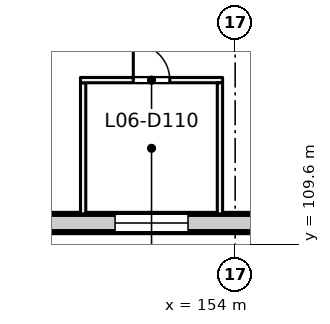
"""IFC4 building model, lengths in metres.
Left out: names, types, materials, properties, quantities, classifications, styles, units other than length and angle.
Written with IfcOpenShell. Run it as: python <this file> out.ifc"""

import sys

from ifc_helpers import new_model, si_unit, direction, frame, frame_2d, origin, place, context, subcontext, project, spatial, rectangle, extrude, element, fill, save


model = new_model("IFC4")
c1 = context("Model", 3, precision=1e-05, world=origin(), true_north=direction((0.0, 1.0)))
c2 = subcontext(c1, "Body", "Model", "MODEL_VIEW")
j1 = project(units=[si_unit("LENGTHUNIT", "METRE"), si_unit("PLANEANGLEUNIT", "RADIAN")], contexts=[c1])
p1 = place(None, origin())
s1 = spatial("IfcSite", under=j1, at=p1, CompositionType="ELEMENT")
p2 = place(p1, origin())
s2 = spatial("IfcBuilding", under=s1, at=p2, CompositionType="ELEMENT")
p3 = place(p2, frame((0.0, 0.0, 31.5)))
s3 = spatial("IfcBuildingStorey", under=s2, at=p3, CompositionType="ELEMENT", Elevation=31.5)
p4 = place(p3, frame((162.93, 110.3, 0.0), z_axis=(0.0, 0.0, 1.0), x_axis=(-1.0, 0.0, 0.0)))
e1 = element("IfcWall", 1, at=p4, inside=s3, PredefinedType="SOLIDWALL", context=c2, shape_type="SweptSolid", body=[
    extrude(rectangle(XDim=31.93, YDim=0.6, at=frame_2d((15.965, 0.0))), origin(), (0.0, 0.0, 1.0), 3.625),
])
p5 = place(p4, frame((1.48, 0.0, 0.9)))
e2 = element("IfcOpeningElement", 2, at=p5, cuts=e1, PredefinedType="OPENING", context=c2, shape_type="SweptSolid", body=[
    extrude(rectangle(XDim=2.4, YDim=2.4, at=frame_2d((1.2, 1.2))), frame((0.0, 0.31, 0.0), z_axis=(0.0, -1.0, 0.0), x_axis=(1.0, 0.0, 0.0)), (0.0, 0.0, 1.0), 0.62),
])
p6 = place(p4, frame((5.98, 0.0, 0.9)))
e3 = element("IfcOpeningElement", 3, at=p6, cuts=e1, PredefinedType="OPENING", context=c2, shape_type="SweptSolid", body=[
    extrude(rectangle(XDim=2.4, YDim=2.4, at=frame_2d((1.2, 1.2))), frame((0.0, 0.31, 0.0), z_axis=(0.0, -1.0, 0.0), x_axis=(1.0, 0.0, 0.0)), (0.0, 0.0, 1.0), 0.62),
])
p7 = place(p4, frame((10.48, 0.0, 0.9)))
e4 = element("IfcOpeningElement", 4, at=p7, cuts=e1, PredefinedType="OPENING", context=c2, shape_type="SweptSolid", body=[
    extrude(rectangle(XDim=2.4, YDim=2.4, at=frame_2d((1.2, 1.2))), frame((0.0, 0.31, 0.0), z_axis=(0.0, -1.0, 0.0), x_axis=(1.0, 0.0, 0.0)), (0.0, 0.0, 1.0), 0.62),
])
p8 = place(p4, frame((14.98, 0.0, 0.9)))
e5 = element("IfcOpeningElement", 5, at=p8, cuts=e1, PredefinedType="OPENING", context=c2, shape_type="SweptSolid", body=[
    extrude(rectangle(XDim=2.4, YDim=2.4, at=frame_2d((1.2, 1.2))), frame((0.0, 0.31, 0.0), z_axis=(0.0, -1.0, 0.0), x_axis=(1.0, 0.0, 0.0)), (0.0, 0.0, 1.0), 0.62),
])
p9 = place(p4, frame((19.48, 0.0, 0.9)))
e6 = element("IfcOpeningElement", 6, at=p9, cuts=e1, PredefinedType="OPENING", context=c2, shape_type="SweptSolid", body=[
    extrude(rectangle(XDim=2.4, YDim=2.4, at=frame_2d((1.2, 1.2))), frame((0.0, 0.31, 0.0), z_axis=(0.0, -1.0, 0.0), x_axis=(1.0, 0.0, 0.0)), (0.0, 0.0, 1.0), 0.62),
])
p10 = place(p4, frame((23.98, 0.0, 0.9)))
e7 = element("IfcOpeningElement", 7, at=p10, cuts=e1, PredefinedType="OPENING", context=c2, shape_type="SweptSolid", body=[
    extrude(rectangle(XDim=2.4, YDim=2.4, at=frame_2d((1.2, 1.2))), frame((0.0, 0.31, 0.0), z_axis=(0.0, -1.0, 0.0), x_axis=(1.0, 0.0, 0.0)), (0.0, 0.0, 1.0), 0.62),
])
p11 = place(p4, frame((28.48, 0.0, 0.9)))
e8 = element("IfcOpeningElement", 8, at=p11, cuts=e1, PredefinedType="OPENING", context=c2, shape_type="SweptSolid", body=[
    extrude(rectangle(XDim=2.4, YDim=2.4, at=frame_2d((1.2, 1.2))), frame((0.0, 0.31, 0.0), z_axis=(0.0, -1.0, 0.0), x_axis=(1.0, 0.0, 0.0)), (0.0, 0.0, 1.0), 0.62),
])
p12 = place(p3, frame((149.0, 110.6, 0.0), z_axis=(0.0, 0.0, 1.0), x_axis=(0.0, 1.0, 0.0)))
e9 = element("IfcWall", 9, at=p12, inside=s3, PredefinedType="PARTITIONING", context=c2, shape_type="SweptSolid", body=[
    extrude(rectangle(XDim=4.312, YDim=0.175, at=frame_2d((2.156, 0.0))), origin(), (0.0, 0.0, 1.0), 3.625),
])
p13 = place(p3, frame((148.912, 115.0, 0.0), z_axis=(0.0, 0.0, 1.0), x_axis=(1.0, 0.0, 0.0)))
e10 = element("IfcWall", 10, at=p13, inside=s3, PredefinedType="PARTITIONING", context=c2, shape_type="SweptSolid", body=[
    extrude(rectangle(XDim=4.676, YDim=0.175, at=frame_2d((2.338, 0.0))), origin(), (0.0, 0.0, 1.0), 3.625),
])
p14 = place(p13, frame((1.738, 0.0, 0.0)))
e11 = element("IfcOpeningElement", 11, at=p14, cuts=e10, PredefinedType="OPENING", context=c2, shape_type="SweptSolid", body=[
    extrude(rectangle(XDim=1.2, YDim=2.1, at=frame_2d((0.6, 1.05))), frame((0.0, 0.097, 0.0), z_axis=(0.0, -1.0, 0.0), x_axis=(1.0, 0.0, 0.0)), (0.0, 0.0, 1.0), 0.195),
])
p15 = place(p3, frame((153.5, 114.912, 0.0), z_axis=(0.0, 0.0, 1.0), x_axis=(0.0, -1.0, 0.0)))
e12 = element("IfcWall", 12, at=p15, inside=s3, PredefinedType="PARTITIONING", context=c2, shape_type="SweptSolid", body=[
    extrude(rectangle(XDim=4.312, YDim=0.175, at=frame_2d((2.156, 0.0))), origin(), (0.0, 0.0, 1.0), 3.625),
])
p16 = place(p7, origin())
e13 = element("IfcWindow", 13, at=p16, inside=s3, PartitioningType="SINGLE_PANEL", PredefinedType="WINDOW", context=c2, shape_type="SweptSolid", body=[
    extrude(rectangle(XDim=2.4, YDim=2.4, at=frame_2d((1.2, 1.2))), frame((0.0, 0.03, 0.0), z_axis=(0.0, -1.0, 0.0), x_axis=(1.0, 0.0, 0.0)), (0.0, 0.0, 1.0), 0.06),
])
fill(e4, e13)
p17 = place(p14, origin())
e14 = element("IfcDoor", 14, at=p17, inside=s3, OperationType="DOUBLE_DOOR_SINGLE_SWING", PredefinedType="DOOR", context=c2, shape_type="SweptSolid", body=[
    extrude(rectangle(XDim=1.2, YDim=2.1, at=frame_2d((0.6, 1.05))), frame((0.0, 0.025, 0.0), z_axis=(0.0, -1.0, 0.0), x_axis=(1.0, 0.0, 0.0)), (0.0, 0.0, 1.0), 0.05),
])
fill(e11, e14)
save(model, sys.argv[1])
